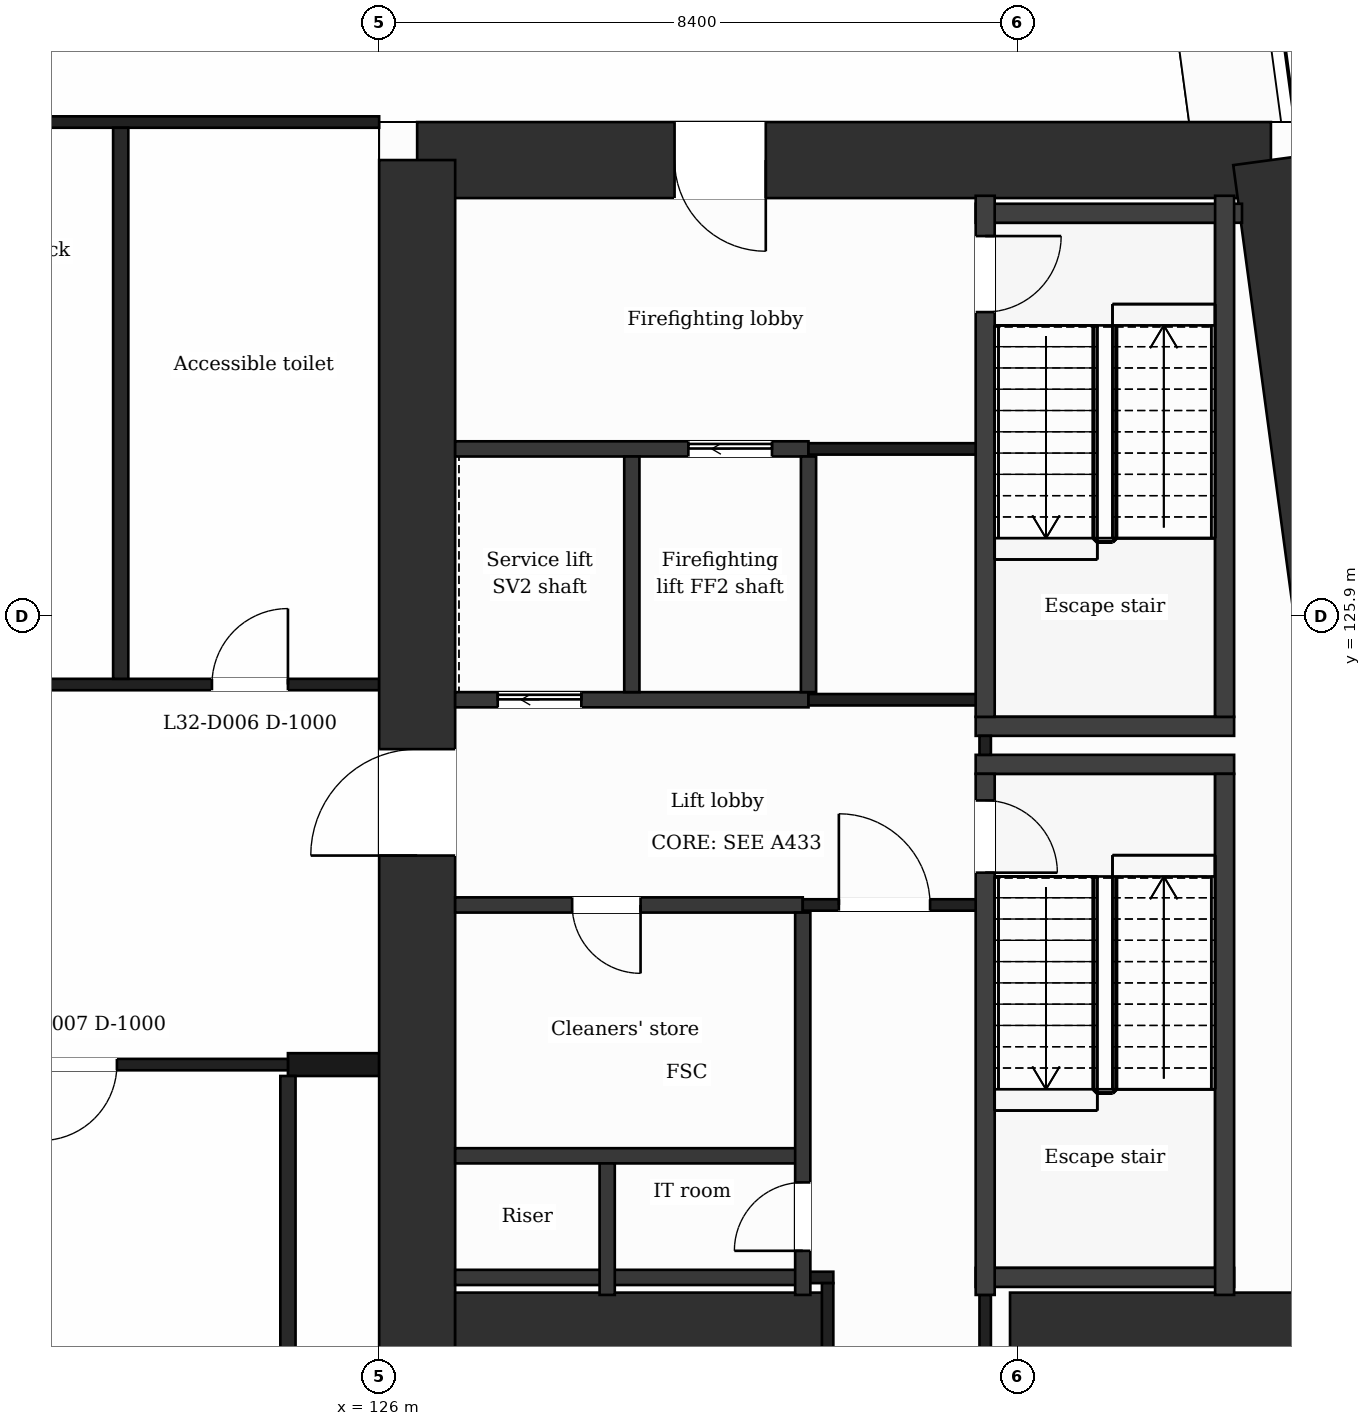
"""IFC4 building model, lengths in metres.
Left out: names, types, materials, properties, quantities, classifications, styles, units other than length and angle.
Written with IfcOpenShell. Run it as: python <this file> out.ifc"""

import sys

from ifc_helpers import new_model, si_unit, direction, frame, frame_2d, origin, place, context, subcontext, project, spatial, rectangle, extrude, element, fill, save


model = new_model("IFC4")
c1 = context("Model", 3, precision=1e-05, world=origin(), true_north=direction((0.0, 1.0)))
c2 = subcontext(c1, "Body", "Model", "MODEL_VIEW")
j1 = project(units=[si_unit("LENGTHUNIT", "METRE"), si_unit("PLANEANGLEUNIT", "RADIAN")], contexts=[c1])
p1 = place(None, origin())
s1 = spatial("IfcSite", under=j1, at=p1, CompositionType="ELEMENT")
p2 = place(p1, origin())
s2 = spatial("IfcBuilding", under=s1, at=p2, CompositionType="ELEMENT")
p3 = place(p2, frame((0.0, 0.0, 135.4)))
s3 = spatial("IfcBuildingStorey", under=s2, at=p3, CompositionType="ELEMENT", Elevation=135.4)
p4 = place(p3, frame((126.5, 131.9, 0.0), z_axis=(0.0, 0.0, 1.0), x_axis=(1.0, 0.0, 0.0)))
e1 = element("IfcWall", 1, at=p4, inside=s3, PredefinedType="SHEAR", context=c2, shape_type="SweptSolid", body=[
    extrude(rectangle(XDim=11.232, YDim=1.0, at=frame_2d((5.616, 0.0))), origin(), (0.0, 0.0, 1.0), 7.4),
])
p5 = place(p4, frame((3.386, 0.0, 0.0)))
e2 = element("IfcOpeningElement", 2, at=p5, cuts=e1, PredefinedType="OPENING", context=c2, shape_type="SweptSolid", body=[
    extrude(rectangle(XDim=1.2, YDim=2.1, at=frame_2d((0.6, 1.05))), frame((0.0, 0.51, 0.0), z_axis=(0.0, -1.0, 0.0), x_axis=(1.0, 0.0, 0.0)), (0.0, 0.0, 1.0), 1.02),
])
p6 = place(p3, frame((137.732, 131.9, 0.0), z_axis=(0.0, 0.0, 1.0), x_axis=(0.133411141623, -0.991060778808, 0.0)))
e3 = element("IfcWall", 3, at=p6, inside=s3, PredefinedType="SHEAR", context=c2, shape_type="SweptSolid", body=[
    extrude(rectangle(XDim=21.189, YDim=1.0, at=frame_2d((10.595, 0.0))), origin(), (0.0, 0.0, 1.0), 7.4),
])
p7 = place(p3, frame((126.5, 110.9, 0.0), z_axis=(0.0, 0.0, 1.0), x_axis=(0.0, 1.0, 0.0)))
e4 = element("IfcWall", 4, at=p7, inside=s3, PredefinedType="SHEAR", context=c2, shape_type="SweptSolid", body=[
    extrude(rectangle(XDim=21.0, YDim=1.0, at=frame_2d((10.5, 0.0))), origin(), (0.0, 0.0, 1.0), 7.4),
])
p8 = place(p7, frame((11.85, 0.0, 0.0)))
e5 = element("IfcOpeningElement", 5, at=p8, cuts=e4, PredefinedType="OPENING", context=c2, shape_type="SweptSolid", body=[
    extrude(rectangle(XDim=1.4, YDim=2.1, at=frame_2d((0.7, 1.05))), frame((0.0, 0.51, 0.0), z_axis=(0.0, -1.0, 0.0), x_axis=(1.0, 0.0, 0.0)), (0.0, 0.0, 1.0), 1.02),
])
p9 = place(p3, frame((127.0, 116.5, 0.0), z_axis=(0.0, 0.0, 1.0), x_axis=(1.0, 0.0, 0.0)))
e6 = element("IfcWall", 6, at=p9, inside=s3, PredefinedType="SHEAR", context=c2, shape_type="SweptSolid", body=[
    extrude(rectangle(XDim=4.9, YDim=1.0, at=frame_2d((2.45, 0.0))), origin(), (0.0, 0.0, 1.0), 7.4),
])
p10 = place(p3, frame((134.3, 116.5, 0.0), z_axis=(0.0, 0.0, 1.0), x_axis=(1.0, 0.0, 0.0)))
e7 = element("IfcWall", 7, at=p10, inside=s3, PredefinedType="SHEAR", context=c2, shape_type="SweptSolid", body=[
    extrude(rectangle(XDim=5.077, YDim=1.0, at=frame_2d((2.539, 0.0))), origin(), (0.0, 0.0, 1.0), 7.4),
])
p11 = place(p3, frame((127.0, 117.2, 0.0), z_axis=(0.0, 0.0, 1.0), x_axis=(1.0, 0.0, 0.0)))
e8 = element("IfcWall", 8, at=p11, inside=s3, PredefinedType="PARTITIONING", context=c2, shape_type="SweptSolid", body=[
    extrude(rectangle(XDim=4.573, YDim=0.2, at=frame_2d((2.287, 0.0))), origin(), (0.0, 0.0, 1.0), 6.9),
])
p12 = place(p3, frame((131.573, 117.2, 0.0), z_axis=(0.0, 0.0, 1.0), x_axis=(1.0, 0.0, 0.0)))
e9 = element("IfcWall", 9, at=p12, inside=s3, PredefinedType="PARTITIONING", context=c2, shape_type="SweptSolid", body=[
    extrude(rectangle(XDim=0.402, YDim=0.15, at=frame_2d((0.201, 0.0))), origin(), (0.0, 0.0, 1.0), 6.9),
])
p13 = place(p3, frame((133.848, 117.2, 0.0), z_axis=(0.0, 0.0, 1.0), x_axis=(1.0, 0.0, 0.0)))
e10 = element("IfcWall", 10, at=p13, inside=s3, PredefinedType="PARTITIONING", context=c2, shape_type="SweptSolid", body=[
    extrude(rectangle(XDim=3.4, YDim=0.25, at=frame_2d((1.7, 0.0))), origin(), (0.0, 0.0, 1.0), 6.9),
])
p14 = place(p3, frame((127.0, 118.8, 0.0), z_axis=(0.0, 0.0, 1.0), x_axis=(1.0, 0.0, 0.0)))
e11 = element("IfcWall", 11, at=p14, inside=s3, PredefinedType="PARTITIONING", context=c2, shape_type="SweptSolid", body=[
    extrude(rectangle(XDim=4.573, YDim=0.2, at=frame_2d((2.287, 0.0))), origin(), (0.0, 0.0, 1.0), 6.9),
])
p15 = place(p3, frame((124.8, 120.0, 0.0), z_axis=(0.0, 0.0, 1.0), x_axis=(1.0, 0.0, 0.0)))
e12 = element("IfcWall", 12, at=p15, inside=s3, PredefinedType="PARTITIONING", context=c2, shape_type="SweptSolid", body=[
    extrude(rectangle(XDim=1.2, YDim=0.3, at=frame_2d((0.6, 0.0))), origin(), (0.0, 0.0, 1.0), 1.0),
])
p16 = place(p3, frame((119.3, 120.0, 0.0), z_axis=(0.0, 0.0, 1.0), x_axis=(1.0, 0.0, 0.0)))
e13 = element("IfcWall", 13, at=p16, inside=s3, PredefinedType="PARTITIONING", context=c2, shape_type="SweptSolid", body=[
    extrude(rectangle(XDim=5.5, YDim=0.15, at=frame_2d((2.75, 0.0))), origin(), (0.0, 0.0, 1.0), 6.9),
])
p17 = place(p16, frame((2.25, 0.0, 0.0)))
e14 = element("IfcOpeningElement", 14, at=p17, cuts=e13, PredefinedType="OPENING", context=c2, shape_type="SweptSolid", body=[
    extrude(rectangle(XDim=1.0, YDim=2.1, at=frame_2d((0.5, 1.05))), frame((0.0, 0.085, 0.0), z_axis=(0.0, -1.0, 0.0), x_axis=(1.0, 0.0, 0.0)), (0.0, 0.0, 1.0), 0.17),
])
p18 = place(p3, frame((127.0, 122.1, 0.0), z_axis=(0.0, 0.0, 1.0), x_axis=(1.0, 0.0, 0.0)))
e15 = element("IfcWall", 15, at=p18, inside=s3, PredefinedType="PARTITIONING", context=c2, shape_type="SweptSolid", body=[
    extrude(rectangle(XDim=4.573, YDim=0.2, at=frame_2d((2.287, 0.0))), origin(), (0.0, 0.0, 1.0), 6.9),
])
p19 = place(p18, frame((1.539, 0.0, 0.0)))
e16 = element("IfcOpeningElement", 16, at=p19, cuts=e15, PredefinedType="OPENING", context=c2, shape_type="SweptSolid", body=[
    extrude(rectangle(XDim=0.9, YDim=2.1, at=frame_2d((0.45, 1.05))), frame((0.0, 0.11, 0.0), z_axis=(0.0, -1.0, 0.0), x_axis=(1.0, 0.0, 0.0)), (0.0, 0.0, 1.0), 0.22),
])
p20 = place(p3, frame((131.573, 122.1, 0.0), z_axis=(0.0, 0.0, 1.0), x_axis=(1.0, 0.0, 0.0)))
e17 = element("IfcWall", 17, at=p20, inside=s3, PredefinedType="PARTITIONING", context=c2, shape_type="SweptSolid", body=[
    extrude(rectangle(XDim=2.4, YDim=0.15, at=frame_2d((1.2, 0.0))), origin(), (0.0, 0.0, 1.0), 6.9),
])
p21 = place(p20, frame((0.475, 0.0, 0.0)))
e18 = element("IfcOpeningElement", 18, at=p21, cuts=e17, PredefinedType="OPENING", context=c2, shape_type="SweptSolid", body=[
    extrude(rectangle(XDim=1.2, YDim=2.1, at=frame_2d((0.6, 1.05))), frame((0.0, 0.085, 0.0), z_axis=(0.0, -1.0, 0.0), x_axis=(1.0, 0.0, 0.0)), (0.0, 0.0, 1.0), 0.17),
])
for number, where, z_axis, x_axis in (
    (19, (133.848, 123.95, 0.0), (0.0, 0.0, 1.0), (1.0, 0.0, 0.0)),
    (20, (133.848, 124.45, 0.0), (0.0, 0.0, 1.0), (1.0, 0.0, 0.0)),
):
    element("IfcWall", number, at=place(p3, frame(where, z_axis=z_axis, x_axis=x_axis)), inside=s3, PredefinedType="PARTITIONING", context=c2, shape_type="SweptSolid", body=[
        extrude(rectangle(XDim=3.4, YDim=0.25, at=frame_2d((1.7, 0.0))), origin(), (0.0, 0.0, 1.0), 6.9),
    ])
p22 = place(p3, frame((127.0, 124.8, 0.0), z_axis=(0.0, 0.0, 1.0), x_axis=(1.0, 0.0, 0.0)))
e21 = element("IfcWall", 21, at=p22, inside=s3, PredefinedType="PARTITIONING", context=c2, shape_type="SweptSolid", body=[
    extrude(rectangle(XDim=4.649, YDim=0.2, at=frame_2d((2.324, 0.0))), origin(), (0.0, 0.0, 1.0), 6.9),
])
p23 = place(p22, frame((0.56, 0.0, 0.0)))
e22 = element("IfcOpeningElement", 22, at=p23, cuts=e21, PredefinedType="OPENING", context=c2, shape_type="SweptSolid", body=[
    extrude(rectangle(XDim=1.1, YDim=2.1, at=frame_2d((0.55, 1.05))), frame((0.0, 0.11, 0.0), z_axis=(0.0, -1.0, 0.0), x_axis=(1.0, 0.0, 0.0)), (0.0, 0.0, 1.0), 0.22),
])
p24 = place(p3, frame((131.649, 124.8, 0.0), z_axis=(0.0, 0.0, 1.0), x_axis=(1.0, 0.0, 0.0)))
e23 = element("IfcWall", 23, at=p24, inside=s3, PredefinedType="PARTITIONING", context=c2, shape_type="SweptSolid", body=[
    extrude(rectangle(XDim=2.449, YDim=0.15, at=frame_2d((1.225, 0.0))), origin(), (0.0, 0.0, 1.0), 6.9),
])
p25 = place(p3, frame((118.925, 125.0, 0.0), z_axis=(0.0, 0.0, 1.0), x_axis=(1.0, 0.0, 0.0)))
e24 = element("IfcWall", 24, at=p25, inside=s3, PredefinedType="PARTITIONING", context=c2, shape_type="SweptSolid", body=[
    extrude(rectangle(XDim=7.075, YDim=0.15, at=frame_2d((3.538, 0.0))), origin(), (0.0, 0.0, 1.0), 6.9),
])
p26 = place(p25, frame((4.875, 0.0, 0.0)))
e25 = element("IfcOpeningElement", 25, at=p26, cuts=e24, PredefinedType="OPENING", context=c2, shape_type="SweptSolid", body=[
    extrude(rectangle(XDim=1.0, YDim=2.1, at=frame_2d((0.5, 1.05))), frame((0.0, 0.085, 0.0), z_axis=(0.0, -1.0, 0.0), x_axis=(1.0, 0.0, 0.0)), (0.0, 0.0, 1.0), 0.17),
])
p27 = place(p3, frame((127.0, 128.1, 0.0), z_axis=(0.0, 0.0, 1.0), x_axis=(1.0, 0.0, 0.0)))
e26 = element("IfcWall", 26, at=p27, inside=s3, PredefinedType="PARTITIONING", context=c2, shape_type="SweptSolid", body=[
    extrude(rectangle(XDim=4.649, YDim=0.2, at=frame_2d((2.324, 0.0))), origin(), (0.0, 0.0, 1.0), 6.9),
])
p28 = place(p27, frame((3.068, 0.0, 0.0)))
e27 = element("IfcOpeningElement", 27, at=p28, cuts=e26, PredefinedType="OPENING", context=c2, shape_type="SweptSolid", body=[
    extrude(rectangle(XDim=1.1, YDim=2.1, at=frame_2d((0.55, 1.05))), frame((0.0, 0.11, 0.0), z_axis=(0.0, -1.0, 0.0), x_axis=(1.0, 0.0, 0.0)), (0.0, 0.0, 1.0), 0.22),
])
p29 = place(p3, frame((131.649, 128.1, 0.0), z_axis=(0.0, 0.0, 1.0), x_axis=(1.0, 0.0, 0.0)))
e28 = element("IfcWall", 28, at=p29, inside=s3, PredefinedType="PARTITIONING", context=c2, shape_type="SweptSolid", body=[
    extrude(rectangle(XDim=2.324, YDim=0.15, at=frame_2d((1.162, 0.0))), origin(), (0.0, 0.0, 1.0), 6.9),
])
p30 = place(p3, frame((133.848, 131.2, 0.0), z_axis=(0.0, 0.0, 1.0), x_axis=(1.0, 0.0, 0.0)))
e29 = element("IfcWall", 29, at=p30, inside=s3, PredefinedType="PARTITIONING", context=c2, shape_type="SweptSolid", body=[
    extrude(rectangle(XDim=3.504, YDim=0.25, at=frame_2d((1.752, 0.0))), origin(), (0.0, 0.0, 1.0), 6.9),
])
p31 = place(p3, frame((119.0, 132.4, 0.0), z_axis=(0.0, 0.0, 1.0), x_axis=(1.0, 0.0, 0.0)))
e30 = element("IfcWall", 30, at=p31, inside=s3, PredefinedType="PARTITIONING", context=c2, shape_type="SweptSolid", body=[
    extrude(rectangle(XDim=7.0, YDim=0.15, at=frame_2d((3.5, 0.0))), origin(), (0.0, 0.0, 1.0), 6.9),
])
p32 = place(p3, frame((122.6, 125.075, 0.0), z_axis=(0.0, 0.0, 1.0), x_axis=(0.0, 1.0, 0.0)))
e31 = element("IfcWall", 31, at=p32, inside=s3, PredefinedType="PARTITIONING", context=c2, shape_type="SweptSolid", body=[
    extrude(rectangle(XDim=7.25, YDim=0.2, at=frame_2d((3.625, 0.0))), origin(), (0.0, 0.0, 1.0), 6.9),
])
p33 = place(p3, frame((124.8, 113.1, 0.0), z_axis=(0.0, 0.0, 1.0), x_axis=(0.0, 1.0, 0.0)))
e32 = element("IfcWall", 32, at=p33, inside=s3, PredefinedType="PARTITIONING", context=c2, shape_type="SweptSolid", body=[
    extrude(rectangle(XDim=6.75, YDim=0.2, at=frame_2d((3.375, 0.0))), origin(), (0.0, 0.0, 1.0), 6.9),
])
p34 = place(p3, frame((129.0, 116.97, 0.0), z_axis=(0.0, 0.0, 1.0), x_axis=(0.0, 1.0, 0.0)))
e33 = element("IfcWall", 33, at=p34, inside=s3, PredefinedType="PARTITIONING", context=c2, shape_type="SweptSolid", body=[
    extrude(rectangle(XDim=1.73, YDim=0.2, at=frame_2d((0.865, 0.0))), origin(), (0.0, 0.0, 1.0), 6.9),
])
p35 = place(p3, frame((129.324, 124.9, 0.0), z_axis=(0.0, 0.0, 1.0), x_axis=(0.0, 1.0, 0.0)))
e34 = element("IfcWall", 34, at=p35, inside=s3, PredefinedType="PARTITIONING", context=c2, shape_type="SweptSolid", body=[
    extrude(rectangle(XDim=3.1, YDim=0.2, at=frame_2d((1.55, 0.0))), origin(), (0.0, 0.0, 1.0), 6.9),
])
p36 = place(p3, frame((131.573, 116.97, 0.0), z_axis=(0.0, 0.0, 1.0), x_axis=(0.0, 1.0, 0.0)))
e35 = element("IfcWall", 35, at=p36, inside=s3, PredefinedType="PARTITIONING", context=c2, shape_type="SweptSolid", body=[
    extrude(rectangle(XDim=5.03, YDim=0.2, at=frame_2d((2.515, 0.0))), origin(), (0.0, 0.0, 1.0), 6.9),
])
p37 = place(p36, frame((0.58, 0.0, 0.0)))
e36 = element("IfcOpeningElement", 36, at=p37, cuts=e35, PredefinedType="OPENING", context=c2, shape_type="SweptSolid", body=[
    extrude(rectangle(XDim=0.9, YDim=2.1, at=frame_2d((0.45, 1.05))), frame((0.0, 0.11, 0.0), z_axis=(0.0, -1.0, 0.0), x_axis=(1.0, 0.0, 0.0)), (0.0, 0.0, 1.0), 0.22),
])
p38 = place(p3, frame((131.649, 124.9, 0.0), z_axis=(0.0, 0.0, 1.0), x_axis=(0.0, 1.0, 0.0)))
e37 = element("IfcWall", 37, at=p38, inside=s3, PredefinedType="PARTITIONING", context=c2, shape_type="SweptSolid", body=[
    extrude(rectangle(XDim=3.1, YDim=0.2, at=frame_2d((1.55, 0.0))), origin(), (0.0, 0.0, 1.0), 6.9),
])
p39 = place(p3, frame((131.9, 116.0, 0.0), z_axis=(0.0, 0.0, 1.0), x_axis=(0.0, 1.0, 0.0)))
e38 = element("IfcWall", 38, at=p39, inside=s3, PredefinedType="PARTITIONING", context=c2, shape_type="SweptSolid", body=[
    extrude(rectangle(XDim=1.125, YDim=0.15, at=frame_2d((0.562, 0.0))), origin(), (0.0, 0.0, 1.0), 6.9),
])
p40 = place(p3, frame((133.973, 116.0, 0.0), z_axis=(0.0, 0.0, 1.0), x_axis=(0.0, 1.0, 0.0)))
e39 = element("IfcWall", 39, at=p40, inside=s3, PredefinedType="PARTITIONING", context=c2, shape_type="SweptSolid", body=[
    extrude(rectangle(XDim=0.97, YDim=0.15, at=frame_2d((0.485, 0.0))), origin(), (0.0, 0.0, 1.0), 6.9),
])
p41 = place(p3, frame((133.973, 124.075, 0.0), z_axis=(0.0, 0.0, 1.0), x_axis=(0.0, 1.0, 0.0)))
e40 = element("IfcWall", 40, at=p41, inside=s3, PredefinedType="PARTITIONING", context=c2, shape_type="SweptSolid", body=[
    extrude(rectangle(XDim=0.25, YDim=0.15, at=frame_2d((0.125, 0.0))), origin(), (0.0, 0.0, 1.0), 6.9),
])
p42 = place(p3, frame((133.973, 116.97, 0.0), z_axis=(0.0, 0.0, 1.0), x_axis=(0.0, 1.0, 0.0)))
e41 = element("IfcWall", 41, at=p42, inside=s3, PredefinedType="PARTITIONING", context=c2, shape_type="SweptSolid", body=[
    extrude(rectangle(XDim=6.855, YDim=0.25, at=frame_2d((3.427, 0.0))), origin(), (0.0, 0.0, 1.0), 6.9),
])
p43 = place(p42, frame((5.555, 0.0, 0.0)))
e42 = element("IfcOpeningElement", 42, at=p43, cuts=e41, PredefinedType="OPENING", context=c2, shape_type="SweptSolid", body=[
    extrude(rectangle(XDim=0.95, YDim=2.1, at=frame_2d((0.475, 1.05))), frame((0.0, 0.135, 0.0), z_axis=(0.0, -1.0, 0.0), x_axis=(1.0, 0.0, 0.0)), (0.0, 0.0, 1.0), 0.27),
])
p44 = place(p3, frame((133.973, 124.575, 0.0), z_axis=(0.0, 0.0, 1.0), x_axis=(0.0, 1.0, 0.0)))
e43 = element("IfcWall", 43, at=p44, inside=s3, PredefinedType="PARTITIONING", context=c2, shape_type="SweptSolid", body=[
    extrude(rectangle(XDim=6.855, YDim=0.25, at=frame_2d((3.427, 0.0))), origin(), (0.0, 0.0, 1.0), 6.9),
])
p45 = place(p44, frame((5.325, 0.0, 0.0)))
e44 = element("IfcOpeningElement", 44, at=p45, cuts=e43, PredefinedType="OPENING", context=c2, shape_type="SweptSolid", body=[
    extrude(rectangle(XDim=1.0, YDim=2.1, at=frame_2d((0.5, 1.05))), frame((0.0, 0.135, 0.0), z_axis=(0.0, -1.0, 0.0), x_axis=(1.0, 0.0, 0.0)), (0.0, 0.0, 1.0), 0.27),
])
for number, where, z_axis, x_axis in (
    (45, (137.123, 116.97, 0.0), (0.0, 0.0, 1.0), (0.0, 1.0, 0.0)),
    (46, (137.123, 124.575, 0.0), (0.0, 0.0, 1.0), (0.0, 1.0, 0.0)),
):
    element("IfcWall", number, at=place(p3, frame(where, z_axis=z_axis, x_axis=x_axis)), inside=s3, PredefinedType="PARTITIONING", context=c2, shape_type="SweptSolid", body=[
        extrude(rectangle(XDim=6.855, YDim=0.25, at=frame_2d((3.427, 0.0))), origin(), (0.0, 0.0, 1.0), 6.9),
    ])
p46 = place(p26, origin())
e47 = element("IfcDoor", 47, at=p46, inside=s3, OperationType="SINGLE_SWING_RIGHT", PredefinedType="DOOR", context=c2, shape_type="SweptSolid", body=[
    extrude(rectangle(XDim=1.0, YDim=2.1, at=frame_2d((0.5, 1.05))), frame((0.0, 0.025, 0.0), z_axis=(0.0, -1.0, 0.0), x_axis=(1.0, 0.0, 0.0)), (0.0, 0.0, 1.0), 0.05),
])
fill(e25, e47)
p47 = place(p17, origin())
e48 = element("IfcDoor", 48, at=p47, inside=s3, OperationType="SINGLE_SWING_LEFT", PredefinedType="DOOR", context=c2, shape_type="SweptSolid", body=[
    extrude(rectangle(XDim=1.0, YDim=2.1, at=frame_2d((0.5, 1.05))), frame((0.0, 0.025, 0.0), z_axis=(0.0, -1.0, 0.0), x_axis=(1.0, 0.0, 0.0)), (0.0, 0.0, 1.0), 0.05),
])
fill(e14, e48)
p48 = place(p21, origin())
e49 = element("IfcDoor", 49, at=p48, inside=s3, OperationType="SINGLE_SWING_LEFT", PredefinedType="DOOR", context=c2, shape_type="SweptSolid", body=[
    extrude(rectangle(XDim=1.2, YDim=2.1, at=frame_2d((0.6, 1.05))), frame((0.0, 0.025, 0.0), z_axis=(0.0, -1.0, 0.0), x_axis=(1.0, 0.0, 0.0)), (0.0, 0.0, 1.0), 0.05),
])
fill(e18, e49)
p49 = place(p28, origin())
e50 = element("IfcDoor", 50, at=p49, inside=s3, OperationType="SLIDING_TO_LEFT", PredefinedType="DOOR", context=c2, shape_type="SweptSolid", body=[
    extrude(rectangle(XDim=1.1, YDim=2.1, at=frame_2d((0.55, 1.05))), frame((0.0, 0.025, 0.0), z_axis=(0.0, -1.0, 0.0), x_axis=(1.0, 0.0, 0.0)), (0.0, 0.0, 1.0), 0.05),
])
fill(e27, e50)
p50 = place(p23, origin())
e51 = element("IfcDoor", 51, at=p50, inside=s3, OperationType="SLIDING_TO_LEFT", PredefinedType="DOOR", context=c2, shape_type="SweptSolid", body=[
    extrude(rectangle(XDim=1.1, YDim=2.1, at=frame_2d((0.55, 1.05))), frame((0.0, 0.025, 0.0), z_axis=(0.0, -1.0, 0.0), x_axis=(1.0, 0.0, 0.0)), (0.0, 0.0, 1.0), 0.05),
])
fill(e22, e51)
p51 = place(p19, origin())
e52 = element("IfcDoor", 52, at=p51, inside=s3, OperationType="SINGLE_SWING_RIGHT", PredefinedType="DOOR", context=c2, shape_type="SweptSolid", body=[
    extrude(rectangle(XDim=0.9, YDim=2.1, at=frame_2d((0.45, 1.05))), frame((0.0, 0.025, 0.0), z_axis=(0.0, -1.0, 0.0), x_axis=(1.0, 0.0, 0.0)), (0.0, 0.0, 1.0), 0.05),
])
fill(e16, e52)
p52 = place(p43, origin())
e53 = element("IfcDoor", 53, at=p52, inside=s3, OperationType="SINGLE_SWING_LEFT", PredefinedType="DOOR", context=c2, shape_type="SweptSolid", body=[
    extrude(rectangle(XDim=0.95, YDim=2.1, at=frame_2d((0.475, 1.05))), frame((0.0, 0.025, 0.0), z_axis=(0.0, -1.0, 0.0), x_axis=(1.0, 0.0, 0.0)), (0.0, 0.0, 1.0), 0.05),
])
fill(e42, e53)
p53 = place(p45, origin())
e54 = element("IfcDoor", 54, at=p53, inside=s3, OperationType="SINGLE_SWING_RIGHT", PredefinedType="DOOR", context=c2, shape_type="SweptSolid", body=[
    extrude(rectangle(XDim=1.0, YDim=2.1, at=frame_2d((0.5, 1.05))), frame((0.0, 0.025, 0.0), z_axis=(0.0, -1.0, 0.0), x_axis=(1.0, 0.0, 0.0)), (0.0, 0.0, 1.0), 0.05),
])
fill(e44, e54)
p54 = place(p37, origin())
e55 = element("IfcDoor", 55, at=p54, inside=s3, OperationType="SINGLE_SWING_LEFT", PredefinedType="DOOR", context=c2, shape_type="SweptSolid", body=[
    extrude(rectangle(XDim=0.9, YDim=2.1, at=frame_2d((0.45, 1.05))), frame((0.0, 0.025, 0.0), z_axis=(0.0, -1.0, 0.0), x_axis=(1.0, 0.0, 0.0)), (0.0, 0.0, 1.0), 0.05),
])
fill(e36, e55)
p55 = place(p5, origin())
e56 = element("IfcDoor", 56, at=p55, inside=s3, OperationType="SINGLE_SWING_RIGHT", PredefinedType="DOOR", context=c2, shape_type="SweptSolid", body=[
    extrude(rectangle(XDim=1.2, YDim=2.1, at=frame_2d((0.6, 1.05))), frame((0.0, 0.025, 0.0), z_axis=(0.0, -1.0, 0.0), x_axis=(1.0, 0.0, 0.0)), (0.0, 0.0, 1.0), 0.05),
])
fill(e2, e56)
p56 = place(p8, origin())
e57 = element("IfcDoor", 57, at=p56, inside=s3, OperationType="SINGLE_SWING_LEFT", PredefinedType="DOOR", context=c2, shape_type="SweptSolid", body=[
    extrude(rectangle(XDim=1.4, YDim=2.1, at=frame_2d((0.7, 1.05))), frame((0.0, 0.025, 0.0), z_axis=(0.0, -1.0, 0.0), x_axis=(1.0, 0.0, 0.0)), (0.0, 0.0, 1.0), 0.05),
])
fill(e5, e57)
save(model, sys.argv[1])
